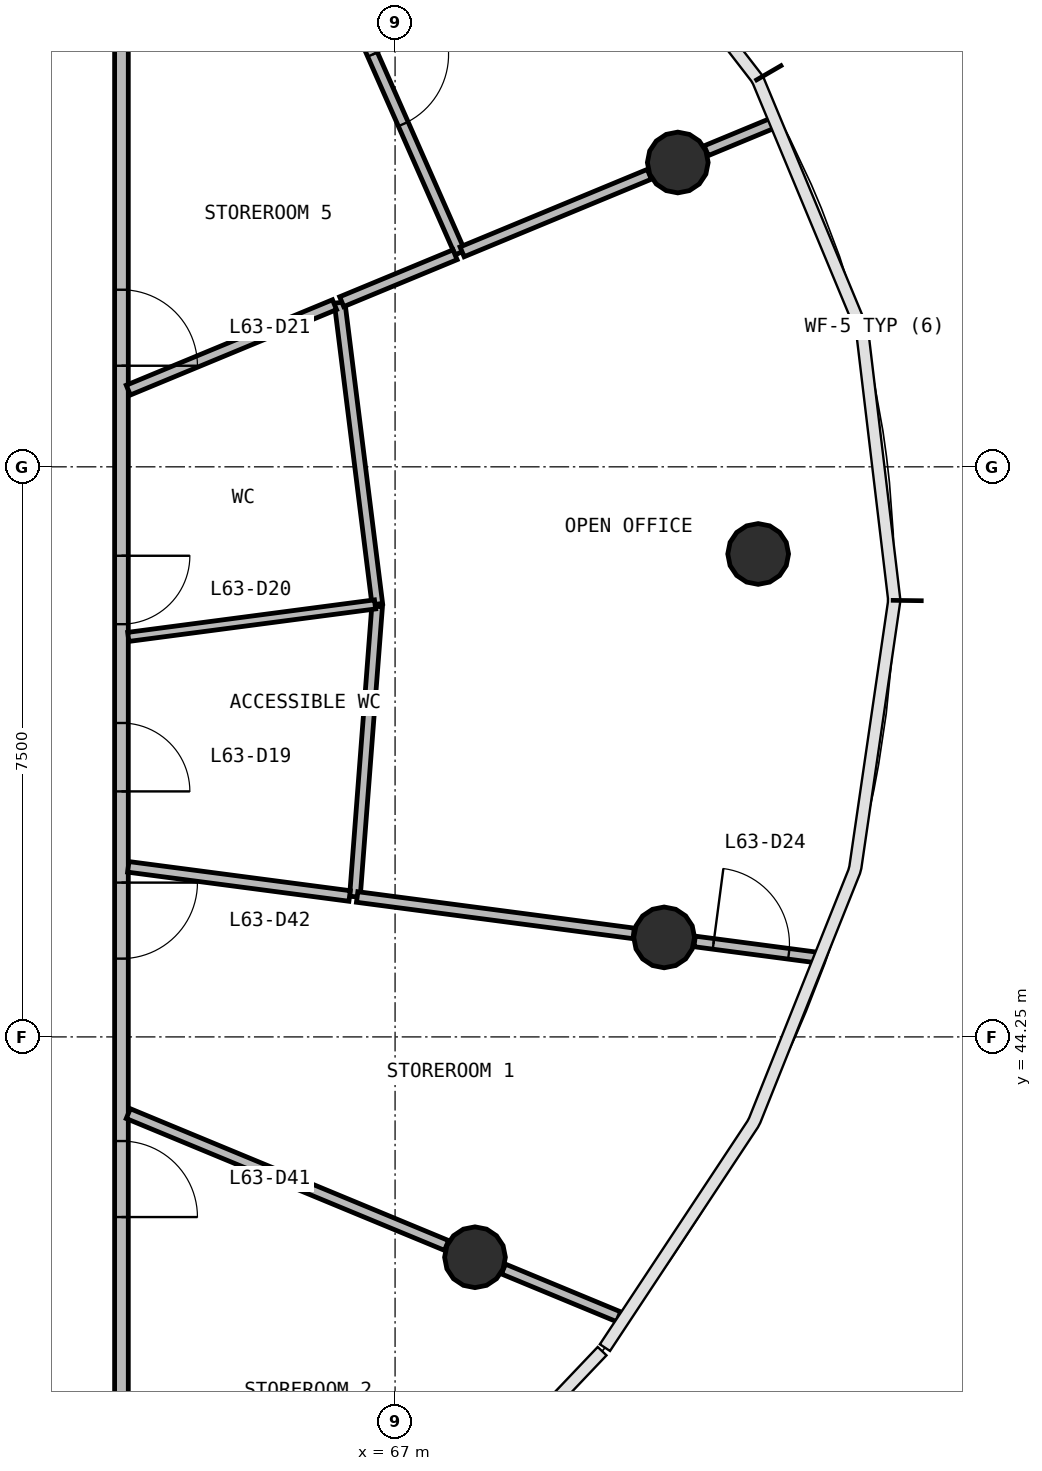
"""IFC4 building model, lengths in metres.
Left out: names, types, materials, properties, quantities, classifications, styles, units other than length and angle.
Written with IfcOpenShell. Run it as: python <this file> out.ifc"""

import sys

from ifc_helpers import new_model, si_unit, direction, frame, frame_2d, origin, origin_2d, place, context, subcontext, project, spatial, rectangle, circle, extrude, source, transform, mapped, element, fill, save


model = new_model("IFC4")
c1 = context("Model", 3, precision=1e-05, world=origin(), true_north=direction((0.0, 1.0)))
c2 = subcontext(c1, "Body", "Model", "MODEL_VIEW")
j1 = project(units=[si_unit("LENGTHUNIT", "METRE"), si_unit("PLANEANGLEUNIT", "RADIAN")], contexts=[c1])
p1 = place(None, origin())
s1 = spatial("IfcSite", under=j1, at=p1, CompositionType="ELEMENT")
p2 = place(p1, origin())
s2 = spatial("IfcBuilding", under=s1, at=p2, CompositionType="ELEMENT")
p3 = place(p2, frame((0.0, 0.0, 257.9)))
s3 = spatial("IfcBuildingStorey", under=s2, at=p3, CompositionType="ELEMENT", Elevation=257.9)
m1 = source(origin(), c2, "Body", "SweptSolid", [
    extrude(circle(Radius=0.4, at=origin_2d()), origin(), (0.0, 0.0, 1.0), 3.9),
])
for number, where, z_axis, x_axis in (
    (1, (71.777, 50.604, 0.0), (0.0, 0.0, 1.0), (1.0, 0.0, 0.0)),
    (2, (70.719, 55.754, 0.0), (0.0, 0.0, 1.0), (1.0, 0.0, 0.0)),
    (3, (68.052, 41.351, 0.0), (0.0, 0.0, 1.0), (1.0, 0.0, 0.0)),
    (4, (70.54, 45.559, 0.0), (0.0, 0.0, 1.0), (1.0, 0.0, 0.0)),
):
    element("IfcColumn", number, at=place(p3, frame(where, z_axis=z_axis, x_axis=x_axis)), inside=s3, PredefinedType="COLUMN", context=c2, shape_type="MappedRepresentation", body=[
        mapped(m1, transform((0.0, 0.0, 0.0), scale=1.0)),
    ])
p4 = place(p3, frame((63.4, 58.37, 0.0), z_axis=(0.0, 0.0, 1.0), x_axis=(0.0, -1.0, 0.0)))
e5 = element("IfcWall", 5, at=p4, inside=s3, PredefinedType="PARTITIONING", context=c2, shape_type="SweptSolid", body=[
    extrude(rectangle(XDim=20.74, YDim=0.18, at=frame_2d((10.37, 0.0))), origin(), (0.0, 0.0, 1.0), 2.88),
])
p5 = place(p4, frame((9.99, 0.0, 0.0)))
e6 = element("IfcOpeningElement", 6, at=p5, cuts=e5, PredefinedType="OPENING", context=c2, shape_type="SweptSolid", body=[
    extrude(rectangle(XDim=0.9, YDim=2.1, at=frame_2d((0.45, 1.05))), frame((0.0, 0.1, 0.0), z_axis=(0.0, -1.0, 0.0), x_axis=(1.0, 0.0, 0.0)), (0.0, 0.0, 1.0), 0.2),
])
p6 = place(p4, frame((7.79, 0.0, 0.0)))
e7 = element("IfcOpeningElement", 7, at=p6, cuts=e5, PredefinedType="OPENING", context=c2, shape_type="SweptSolid", body=[
    extrude(rectangle(XDim=0.9, YDim=2.1, at=frame_2d((0.45, 1.05))), frame((0.0, 0.1, 0.0), z_axis=(0.0, -1.0, 0.0), x_axis=(1.0, 0.0, 0.0)), (0.0, 0.0, 1.0), 0.2),
])
p7 = place(p4, frame((4.29, 0.0, 0.0)))
e8 = element("IfcOpeningElement", 8, at=p7, cuts=e5, PredefinedType="OPENING", context=c2, shape_type="SweptSolid", body=[
    extrude(rectangle(XDim=1.0, YDim=2.1, at=frame_2d((0.5, 1.05))), frame((0.0, 0.1, 0.0), z_axis=(0.0, -1.0, 0.0), x_axis=(1.0, 0.0, 0.0)), (0.0, 0.0, 1.0), 0.2),
])
p8 = place(p4, frame((15.49, 0.0, 0.0)))
e9 = element("IfcOpeningElement", 9, at=p8, cuts=e5, PredefinedType="OPENING", context=c2, shape_type="SweptSolid", body=[
    extrude(rectangle(XDim=1.0, YDim=2.1, at=frame_2d((0.5, 1.05))), frame((0.0, 0.1, 0.0), z_axis=(0.0, -1.0, 0.0), x_axis=(1.0, 0.0, 0.0)), (0.0, 0.0, 1.0), 0.2),
])
p9 = place(p4, frame((12.09, 0.0, 0.0)))
e10 = element("IfcOpeningElement", 10, at=p9, cuts=e5, PredefinedType="OPENING", context=c2, shape_type="SweptSolid", body=[
    extrude(rectangle(XDim=1.0, YDim=2.1, at=frame_2d((0.5, 1.05))), frame((0.0, 0.1, 0.0), z_axis=(0.0, -1.0, 0.0), x_axis=(1.0, 0.0, 0.0)), (0.0, 0.0, 1.0), 0.2),
])
p10 = place(p3, frame((63.49, 43.241, 0.0), z_axis=(0.0, 0.0, 1.0), x_axis=(0.923863854318, -0.382721280679, 0.0)))
e11 = element("IfcWall", 11, at=p10, inside=s3, PredefinedType="PARTITIONING", context=c2, shape_type="SweptSolid", body=[
    extrude(rectangle(XDim=4.532, YDim=0.14, at=frame_2d((2.266, 0.0))), origin(), (0.0, 0.0, 1.0), 2.88),
])
p11 = place(p3, frame((66.021, 58.722, 0.0), z_axis=(0.0, 0.0, 1.0), x_axis=(0.403558147764, -0.914953999594, 0.0)))
e12 = element("IfcWall", 12, at=p11, inside=s3, PredefinedType="PARTITIONING", context=c2, shape_type="SweptSolid", body=[
    extrude(rectangle(XDim=4.542, YDim=0.14, at=frame_2d((2.271, 0.0))), origin(), (0.0, 0.0, 1.0), 2.88),
])
p12 = place(p11, frame((1.691, 0.0, 0.0)))
e13 = element("IfcOpeningElement", 13, at=p12, cuts=e12, PredefinedType="OPENING", context=c2, shape_type="SweptSolid", body=[
    extrude(rectangle(XDim=1.0, YDim=2.1, at=frame_2d((0.5, 1.05))), frame((0.0, 0.08, 0.0), z_axis=(0.0, -1.0, 0.0), x_axis=(1.0, 0.0, 0.0)), (0.0, 0.0, 1.0), 0.16),
])
p13 = place(p3, frame((66.766, 49.944, 0.0), z_axis=(0.0, 0.0, 1.0), x_axis=(-0.124094865126, 0.992270358546, 0.0)))
e14 = element("IfcWall", 14, at=p13, inside=s3, PredefinedType="PARTITIONING", context=c2, shape_type="SweptSolid", body=[
    extrude(rectangle(XDim=3.998, YDim=0.14, at=frame_2d((1.999, 0.0))), origin(), (0.0, 0.0, 1.0), 2.88),
])
p14 = place(p3, frame((66.471, 46.095, 0.0), z_axis=(0.0, 0.0, 1.0), x_axis=(0.076355321154, 0.997080671226, 0.0)))
e15 = element("IfcWall", 15, at=p14, inside=s3, PredefinedType="PARTITIONING", context=c2, shape_type="SweptSolid", body=[
    extrude(rectangle(XDim=3.831, YDim=0.14, at=frame_2d((1.915, 0.0))), origin(), (0.0, 0.0, 1.0), 2.88),
])
p15 = place(p3, frame((66.501, 46.091, 0.0), z_axis=(0.0, 0.0, 1.0), x_axis=(0.99145021839, -0.130485495185, 0.0)))
e16 = element("IfcWall", 16, at=p15, inside=s3, PredefinedType="PARTITIONING", context=c2, shape_type="SweptSolid", body=[
    extrude(rectangle(XDim=3.669, YDim=0.14, at=frame_2d((1.834, 0.0))), origin(), (0.0, 0.0, 1.0), 2.88),
])
p16 = place(p3, frame((63.49, 52.759, 0.0), z_axis=(0.0, 0.0, 1.0), x_axis=(0.923884097698, 0.382672410844, 0.0)))
e17 = element("IfcWall", 17, at=p16, inside=s3, PredefinedType="PARTITIONING", context=c2, shape_type="SweptSolid", body=[
    extrude(rectangle(XDim=2.937, YDim=0.14, at=frame_2d((1.468, 0.0))), origin(), (0.0, 0.0, 1.0), 2.88),
])
p17 = place(p3, frame((63.49, 46.487, 0.0), z_axis=(0.0, 0.0, 1.0), x_axis=(0.991447220712, -0.130508270019, 0.0)))
e18 = element("IfcWall", 18, at=p17, inside=s3, PredefinedType="PARTITIONING", context=c2, shape_type="SweptSolid", body=[
    extrude(rectangle(XDim=2.937, YDim=0.14, at=frame_2d((1.469, 0.0))), origin(), (0.0, 0.0, 1.0), 2.88),
])
p18 = place(p3, frame((67.882, 54.579, 0.0), z_axis=(0.0, 0.0, 1.0), x_axis=(0.923906367218, 0.382618641225, 0.0)))
e19 = element("IfcWall", 19, at=p18, inside=s3, PredefinedType="PARTITIONING", context=c2, shape_type="SweptSolid", body=[
    extrude(rectangle(XDim=2.667, YDim=0.14, at=frame_2d((1.333, 0.0))), origin(), (0.0, 0.0, 1.0), 2.88),
])
p19 = place(p3, frame((66.298, 53.922, 0.0), z_axis=(0.0, 0.0, 1.0), x_axis=(0.923849088281, 0.382756922972, 0.0)))
e20 = element("IfcWall", 20, at=p19, inside=s3, PredefinedType="PARTITIONING", context=c2, shape_type="SweptSolid", body=[
    extrude(rectangle(XDim=1.615, YDim=0.14, at=frame_2d((0.807, 0.0))), origin(), (0.0, 0.0, 1.0), 2.88),
])
p20 = place(p3, frame((68.426, 41.196, 0.0), z_axis=(0.0, 0.0, 1.0), x_axis=(0.923884509339, -0.38267141702, 0.0)))
e21 = element("IfcWall", 21, at=p20, inside=s3, PredefinedType="PARTITIONING", context=c2, shape_type="SweptSolid", body=[
    extrude(rectangle(XDim=1.642, YDim=0.14, at=frame_2d((0.821, 0.0))), origin(), (0.0, 0.0, 1.0), 2.88),
])
p21 = place(p3, frame((70.941, 45.506, 0.0), z_axis=(0.0, 0.0, 1.0), x_axis=(0.991450239083, -0.130485337956, 0.0)))
e22 = element("IfcWall", 22, at=p21, inside=s3, PredefinedType="PARTITIONING", context=c2, shape_type="SweptSolid", body=[
    extrude(rectangle(XDim=1.639, YDim=0.14, at=frame_2d((0.819, 0.0))), origin(), (0.0, 0.0, 1.0), 2.88),
])
p22 = place(p21, frame((0.25, 0.0, 0.0)))
e23 = element("IfcOpeningElement", 23, at=p22, cuts=e22, PredefinedType="OPENING", context=c2, shape_type="SweptSolid", body=[
    extrude(rectangle(XDim=1.0, YDim=2.1, at=frame_2d((0.5, 1.05))), frame((0.0, 0.08, 0.0), z_axis=(0.0, -1.0, 0.0), x_axis=(1.0, 0.0, 0.0)), (0.0, 0.0, 1.0), 0.16),
])
p23 = place(p3, frame((71.094, 55.909, 0.0), z_axis=(0.0, 0.0, 1.0), x_axis=(0.923893859205, 0.382648842835, 0.0)))
e24 = element("IfcWall", 24, at=p23, inside=s3, PredefinedType="PARTITIONING", context=c2, shape_type="SweptSolid", body=[
    extrude(rectangle(XDim=0.944, YDim=0.14, at=frame_2d((0.472, 0.0))), origin(), (0.0, 0.0, 1.0), 2.88),
])
p24 = place(p3, frame((63.49, 49.513, 0.0), z_axis=(0.0, 0.0, 1.0), x_axis=(0.99144211057, 0.130547084946, 0.0)))
e25 = element("IfcWall", 25, at=p24, inside=s3, PredefinedType="PARTITIONING", context=c2, shape_type="SweptSolid", body=[
    extrude(rectangle(XDim=3.275, YDim=0.12, at=frame_2d((1.637, 0.0))), origin(), (0.0, 0.0, 1.0), 2.88),
])
m2 = source(origin(), c2, "Body", "SweptSolid", [
    extrude(rectangle(XDim=0.9, YDim=2.1, at=frame_2d((0.45, 1.05))), frame((0.0, 0.025, 0.0), z_axis=(0.0, -1.0, 0.0), x_axis=(1.0, 0.0, 0.0)), (0.0, 0.0, 1.0), 0.05),
])
p25 = place(p5, origin())
e26 = element("IfcDoor", 26, at=p25, inside=s3, OperationType="SINGLE_SWING_RIGHT", PredefinedType="DOOR", context=c2, shape_type="MappedRepresentation", body=[
    mapped(m2, transform((0.0, 0.0, 0.0), scale=1.0)),
])
fill(e6, e26)
p26 = place(p6, origin())
e27 = element("IfcDoor", 27, at=p26, inside=s3, OperationType="SINGLE_SWING_LEFT", PredefinedType="DOOR", context=c2, shape_type="MappedRepresentation", body=[
    mapped(m2, transform((0.0, 0.0, 0.0), scale=1.0)),
])
fill(e7, e27)
m3 = source(origin(), c2, "Body", "SweptSolid", [
    extrude(rectangle(XDim=1.0, YDim=2.1, at=frame_2d((0.5, 1.05))), frame((0.0, 0.025, 0.0), z_axis=(0.0, -1.0, 0.0), x_axis=(1.0, 0.0, 0.0)), (0.0, 0.0, 1.0), 0.05),
])
p27 = place(p7, origin())
e28 = element("IfcDoor", 28, at=p27, inside=s3, OperationType="SINGLE_SWING_RIGHT", PredefinedType="DOOR", context=c2, shape_type="MappedRepresentation", body=[
    mapped(m3, transform((0.0, 0.0, 0.0), scale=1.0)),
])
fill(e8, e28)
p28 = place(p12, origin())
e29 = element("IfcDoor", 29, at=p28, inside=s3, OperationType="SINGLE_SWING_LEFT", PredefinedType="DOOR", context=c2, shape_type="MappedRepresentation", body=[
    mapped(m3, transform((0.0, 0.0, 0.0), scale=1.0)),
])
fill(e13, e29)
p29 = place(p22, origin())
e30 = element("IfcDoor", 30, at=p29, inside=s3, OperationType="SINGLE_SWING_LEFT", PredefinedType="DOOR", context=c2, shape_type="MappedRepresentation", body=[
    mapped(m3, transform((0.0, 0.0, 0.0), scale=1.0)),
])
fill(e23, e30)
p30 = place(p8, origin())
e31 = element("IfcDoor", 31, at=p30, inside=s3, OperationType="SINGLE_SWING_RIGHT", PredefinedType="DOOR", context=c2, shape_type="MappedRepresentation", body=[
    mapped(m3, transform((0.0, 0.0, 0.0), scale=1.0)),
])
fill(e9, e31)
p31 = place(p9, origin())
e32 = element("IfcDoor", 32, at=p31, inside=s3, OperationType="SINGLE_SWING_LEFT", PredefinedType="DOOR", context=c2, shape_type="MappedRepresentation", body=[
    mapped(m3, transform((0.0, 0.0, 0.0), scale=1.0)),
])
fill(e10, e32)
save(model, sys.argv[1])
